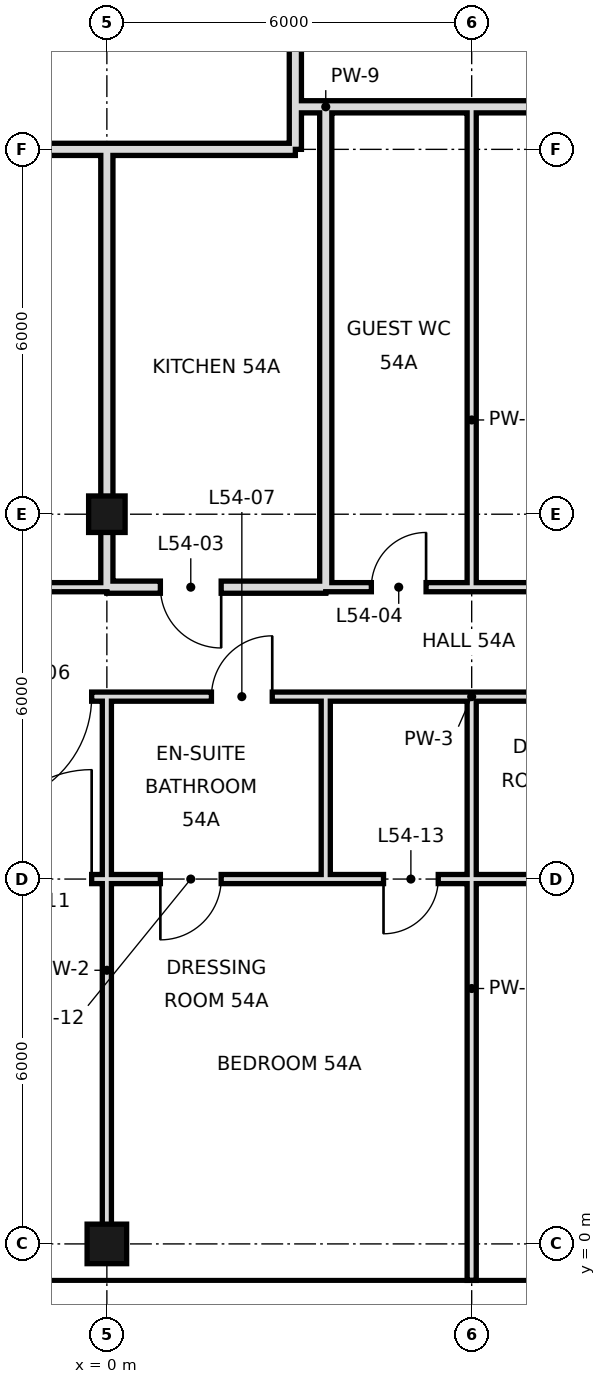
"""IFC4 building model, lengths in metres.
Left out: names, types, materials, properties, quantities, classifications, styles, units other than length and angle.
Written with IfcOpenShell. Run it as: python <this file> out.ifc"""

import sys

from ifc_helpers import new_model, si_unit, direction, frame, frame_2d, origin, origin_with_axes, origin_2d, place, context, subcontext, project, spatial, rectangle, hollow_rectangle, extrude, element, fill, save


model = new_model("IFC4")
c1 = context("Model", 3, precision=1e-05, world=origin(), true_north=direction((0.0, 1.0)))
c2 = subcontext(c1, "Body", "Model", "MODEL_VIEW")
j1 = project(units=[si_unit("LENGTHUNIT", "METRE"), si_unit("PLANEANGLEUNIT", "RADIAN")], contexts=[c1])
p1 = place(None, origin())
s1 = spatial("IfcSite", under=j1, at=p1, CompositionType="ELEMENT")
p2 = place(p1, origin())
s2 = spatial("IfcBuilding", under=s1, at=p2, CompositionType="ELEMENT")
p3 = place(p2, frame((0.0, 0.0, 229.8)))
s3 = spatial("IfcBuildingStorey", under=s2, at=p3, CompositionType="ELEMENT", Elevation=229.8)
p4 = place(p3, origin_with_axes())
e1 = element("IfcColumn", 1, at=p4, inside=s3, PredefinedType="COLUMN", context=c2, shape_type="SweptSolid", body=[
    extrude(hollow_rectangle(XDim=0.65, YDim=0.65, WallThickness=0.032, at=origin_2d()), origin(), (0.0, 0.0, 1.0), 4.4),
])
p5 = place(p3, frame((0.0, 12.0, 0.0), z_axis=(0.0, 0.0, 1.0), x_axis=(1.0, 0.0, 0.0)))
e2 = element("IfcColumn", 2, at=p5, inside=s3, PredefinedType="COLUMN", context=c2, shape_type="SweptSolid", body=[
    extrude(hollow_rectangle(XDim=0.6, YDim=0.6, WallThickness=0.028, at=origin_2d()), origin(), (0.0, 0.0, 1.0), 4.4),
])
p6 = place(p3, frame((0.0, 10.8, 0.0), z_axis=(0.0, 0.0, 1.0), x_axis=(0.0, 1.0, 0.0)))
e3 = element("IfcWall", 3, at=p6, inside=s3, PredefinedType="SOLIDWALL", context=c2, shape_type="SweptSolid", body=[
    extrude(rectangle(XDim=7.2, YDim=0.2, at=frame_2d((3.6, 0.0))), origin(), (0.0, 0.0, 1.0), 3.4),
])
p7 = place(p3, frame((0.0, 0.0, 0.0), z_axis=(0.0, 0.0, 1.0), x_axis=(0.0, 1.0, 0.0)))
e4 = element("IfcWall", 4, at=p7, inside=s3, PredefinedType="PARTITIONING", context=c2, shape_type="SweptSolid", body=[
    extrude(rectangle(XDim=9.0, YDim=0.15, at=frame_2d((4.5, 0.0))), origin(), (0.0, 0.0, 1.0), 3.4),
])
p8 = place(p3, frame((3.1, 18.7, 0.0), z_axis=(0.0, 0.0, 1.0), x_axis=(0.0, 1.0, 0.0)))
e5 = element("IfcWall", 5, at=p8, inside=s3, PredefinedType="SOLIDWALL", context=c2, shape_type="SweptSolid", body=[
    extrude(rectangle(XDim=25.7, YDim=0.2, at=frame_2d((12.85, 0.0))), origin(), (0.0, 0.0, 1.0), 3.65),
])
p9 = place(p8, frame((12.84, 0.0, 0.0)))
e6 = element("IfcOpeningElement", 6, at=p9, cuts=e5, PredefinedType="OPENING", context=c2, shape_type="SweptSolid", body=[
    extrude(rectangle(XDim=1.2, YDim=2.4, at=frame_2d((0.6, 1.2))), frame((0.0, 0.11, 0.0), z_axis=(0.0, -1.0, 0.0), x_axis=(1.0, 0.0, 0.0)), (0.0, 0.0, 1.0), 0.22),
])
p10 = place(p3, frame((3.1, 18.0, 0.0), z_axis=(0.0, 0.0, 1.0), x_axis=(0.0, 1.0, 0.0)))
e7 = element("IfcWall", 7, at=p10, inside=s3, PredefinedType="SOLIDWALL", context=c2, shape_type="SweptSolid", body=[
    extrude(rectangle(XDim=0.7, YDim=0.2, at=frame_2d((0.35, 0.0))), origin(), (0.0, 0.0, 1.0), 3.65),
])
p11 = place(p3, frame((3.6, 10.8, 0.0), z_axis=(0.0, 0.0, 1.0), x_axis=(0.0, 1.0, 0.0)))
e8 = element("IfcWall", 8, at=p11, inside=s3, PredefinedType="SOLIDWALL", context=c2, shape_type="SweptSolid", body=[
    extrude(rectangle(XDim=7.9, YDim=0.2, at=frame_2d((3.95, 0.0))), origin(), (0.0, 0.0, 1.0), 3.4),
])
p12 = place(p3, frame((3.6, 6.0, 0.0), z_axis=(0.0, 0.0, 1.0), x_axis=(0.0, 1.0, 0.0)))
e9 = element("IfcWall", 9, at=p12, inside=s3, PredefinedType="PARTITIONING", context=c2, shape_type="SweptSolid", body=[
    extrude(rectangle(XDim=3.0, YDim=0.15, at=frame_2d((1.5, 0.0))), origin(), (0.0, 0.0, 1.0), 4.1),
])
p13 = place(p3, frame((6.0, -0.6, 0.0), z_axis=(0.0, 0.0, 1.0), x_axis=(0.0, 1.0, 0.0)))
e10 = element("IfcWall", 10, at=p13, inside=s3, PredefinedType="PARTITIONING", context=c2, shape_type="SweptSolid", body=[
    extrude(rectangle(XDim=6.6, YDim=0.15, at=frame_2d((3.3, 0.0))), origin(), (0.0, 0.0, 1.0), 3.4),
])
p14 = place(p3, frame((6.0, 6.0, 0.0), z_axis=(0.0, 0.0, 1.0), x_axis=(0.0, 1.0, 0.0)))
e11 = element("IfcWall", 11, at=p14, inside=s3, PredefinedType="PARTITIONING", context=c2, shape_type="SweptSolid", body=[
    extrude(rectangle(XDim=3.0, YDim=0.15, at=frame_2d((1.5, 0.0))), origin(), (0.0, 0.0, 1.0), 3.4),
])
p15 = place(p3, frame((6.0, 10.8, 0.0), z_axis=(0.0, 0.0, 1.0), x_axis=(0.0, 1.0, 0.0)))
e12 = element("IfcWall", 12, at=p15, inside=s3, PredefinedType="PARTITIONING", context=c2, shape_type="SweptSolid", body=[
    extrude(rectangle(XDim=7.9, YDim=0.15, at=frame_2d((3.95, 0.0))), origin(), (0.0, 0.0, 1.0), 3.4),
])
p16 = place(p3, frame((0.0, 10.8, 0.0), z_axis=(0.0, 0.0, 1.0), x_axis=(1.0, 0.0, 0.0)))
e13 = element("IfcWall", 13, at=p16, inside=s3, PredefinedType="SOLIDWALL", context=c2, shape_type="SweptSolid", body=[
    extrude(rectangle(XDim=3.6, YDim=0.2, at=frame_2d((1.8, 0.0))), origin(), (0.0, 0.0, 1.0), 3.4),
])
p17 = place(p16, frame((0.88, 0.0, 0.0)))
e14 = element("IfcOpeningElement", 14, at=p17, cuts=e13, PredefinedType="OPENING", context=c2, shape_type="SweptSolid", body=[
    extrude(rectangle(XDim=1.0, YDim=2.4, at=frame_2d((0.5, 1.2))), frame((0.0, 0.11, 0.0), z_axis=(0.0, -1.0, 0.0), x_axis=(1.0, 0.0, 0.0)), (0.0, 0.0, 1.0), 0.22),
])
p18 = place(p3, frame((-12.6, 10.8, 0.0), z_axis=(0.0, 0.0, 1.0), x_axis=(1.0, 0.0, 0.0)))
e15 = element("IfcWall", 15, at=p18, inside=s3, PredefinedType="PARTITIONING", context=c2, shape_type="SweptSolid", body=[
    extrude(rectangle(XDim=12.6, YDim=0.15, at=frame_2d((6.3, 0.0))), origin(), (0.0, 0.0, 1.0), 4.1),
])
p19 = place(p18, frame((10.3, 0.0, 0.0)))
e16 = element("IfcOpeningElement", 16, at=p19, cuts=e15, PredefinedType="OPENING", context=c2, shape_type="SweptSolid", body=[
    extrude(rectangle(XDim=1.0, YDim=2.4, at=frame_2d((0.5, 1.2))), frame((0.0, 0.085, 0.0), z_axis=(0.0, -1.0, 0.0), x_axis=(1.0, 0.0, 0.0)), (0.0, 0.0, 1.0), 0.17),
])
p20 = place(p3, frame((6.0, 10.8, 0.0), z_axis=(0.0, 0.0, 1.0), x_axis=(1.0, 0.0, 0.0)))
e17 = element("IfcWall", 17, at=p20, inside=s3, PredefinedType="PARTITIONING", context=c2, shape_type="SweptSolid", body=[
    extrude(rectangle(XDim=18.0, YDim=0.15, at=frame_2d((9.0, 0.0))), origin(), (0.0, 0.0, 1.0), 4.1),
])
p21 = place(p20, frame((2.5, 0.0, 0.0)))
e18 = element("IfcOpeningElement", 18, at=p21, cuts=e17, PredefinedType="OPENING", context=c2, shape_type="SweptSolid", body=[
    extrude(rectangle(XDim=1.0, YDim=2.4, at=frame_2d((0.5, 1.2))), frame((0.0, 0.085, 0.0), z_axis=(0.0, -1.0, 0.0), x_axis=(1.0, 0.0, 0.0)), (0.0, 0.0, 1.0), 0.17),
])
p22 = place(p20, frame((11.5, 0.0, 0.0)))
e19 = element("IfcOpeningElement", 19, at=p22, cuts=e17, PredefinedType="OPENING", context=c2, shape_type="SweptSolid", body=[
    extrude(rectangle(XDim=1.0, YDim=2.4, at=frame_2d((0.5, 1.2))), frame((0.0, 0.085, 0.0), z_axis=(0.0, -1.0, 0.0), x_axis=(1.0, 0.0, 0.0)), (0.0, 0.0, 1.0), 0.17),
])
p23 = place(p3, frame((3.6, 10.8, 0.0), z_axis=(0.0, 0.0, 1.0), x_axis=(1.0, 0.0, 0.0)))
e20 = element("IfcWall", 20, at=p23, inside=s3, PredefinedType="PARTITIONING", context=c2, shape_type="SweptSolid", body=[
    extrude(rectangle(XDim=2.4, YDim=0.15, at=frame_2d((1.2, 0.0))), origin(), (0.0, 0.0, 1.0), 4.1),
])
p24 = place(p23, frame((0.75, 0.0, 0.0)))
e21 = element("IfcOpeningElement", 21, at=p24, cuts=e20, PredefinedType="OPENING", context=c2, shape_type="SweptSolid", body=[
    extrude(rectangle(XDim=0.9, YDim=2.4, at=frame_2d((0.45, 1.2))), frame((0.0, 0.085, 0.0), z_axis=(0.0, -1.0, 0.0), x_axis=(1.0, 0.0, 0.0)), (0.0, 0.0, 1.0), 0.17),
])
p25 = place(p3, frame((0.0, 18.0, 0.0), z_axis=(0.0, 0.0, 1.0), x_axis=(1.0, 0.0, 0.0)))
e22 = element("IfcWall", 22, at=p25, inside=s3, PredefinedType="SOLIDWALL", context=c2, shape_type="SweptSolid", body=[
    extrude(rectangle(XDim=3.1, YDim=0.2, at=frame_2d((1.55, 0.0))), origin(), (0.0, 0.0, 1.0), 3.4),
])
p26 = place(p3, frame((-12.6, 18.0, 0.0), z_axis=(0.0, 0.0, 1.0), x_axis=(1.0, 0.0, 0.0)))
e23 = element("IfcWall", 23, at=p26, inside=s3, PredefinedType="SOLIDWALL", context=c2, shape_type="SweptSolid", body=[
    extrude(rectangle(XDim=12.6, YDim=0.2, at=frame_2d((6.3, 0.0))), origin(), (0.0, 0.0, 1.0), 3.4),
])
p27 = place(p3, frame((3.6, 18.7, 0.0), z_axis=(0.0, 0.0, 1.0), x_axis=(1.0, 0.0, 0.0)))
e24 = element("IfcWall", 24, at=p27, inside=s3, PredefinedType="SOLIDWALL", context=c2, shape_type="SweptSolid", body=[
    extrude(rectangle(XDim=20.4, YDim=0.2, at=frame_2d((10.2, 0.0))), origin(), (0.0, 0.0, 1.0), 3.4),
])
p28 = place(p27, frame((4.8, 0.0, 0.0)))
e25 = element("IfcOpeningElement", 25, at=p28, cuts=e24, PredefinedType="OPENING", context=c2, shape_type="SweptSolid", body=[
    extrude(rectangle(XDim=1.2, YDim=2.4, at=frame_2d((0.6, 1.2))), frame((0.0, 0.11, 0.0), z_axis=(0.0, -1.0, 0.0), x_axis=(1.0, 0.0, 0.0)), (0.0, 0.0, 1.0), 0.22),
])
p29 = place(p3, frame((3.1, 18.7, 0.0), z_axis=(0.0, 0.0, 1.0), x_axis=(1.0, 0.0, 0.0)))
e26 = element("IfcWall", 26, at=p29, inside=s3, PredefinedType="SOLIDWALL", context=c2, shape_type="SweptSolid", body=[
    extrude(rectangle(XDim=0.5, YDim=0.2, at=frame_2d((0.25, 0.0))), origin(), (0.0, 0.0, 1.0), 4.1),
])
p30 = place(p3, frame((-12.0, 6.0, 0.0), z_axis=(0.0, 0.0, 1.0), x_axis=(1.0, 0.0, 0.0)))
e27 = element("IfcWall", 27, at=p30, inside=s3, PredefinedType="PARTITIONING", context=c2, shape_type="SweptSolid", body=[
    extrude(rectangle(XDim=15.6, YDim=0.15, at=frame_2d((7.8, 0.0))), origin(), (0.0, 0.0, 1.0), 3.4),
])
p31 = place(p30, frame((9.95, 0.0, 0.0)))
e28 = element("IfcOpeningElement", 28, at=p31, cuts=e27, PredefinedType="OPENING", context=c2, shape_type="SweptSolid", body=[
    extrude(rectangle(XDim=1.8, YDim=2.4, at=frame_2d((0.9, 1.2))), frame((0.0, 0.085, 0.0), z_axis=(0.0, -1.0, 0.0), x_axis=(1.0, 0.0, 0.0)), (0.0, 0.0, 1.0), 0.17),
])
p32 = place(p30, frame((12.88, 0.0, 0.0)))
e29 = element("IfcOpeningElement", 29, at=p32, cuts=e27, PredefinedType="OPENING", context=c2, shape_type="SweptSolid", body=[
    extrude(rectangle(XDim=1.0, YDim=2.4, at=frame_2d((0.5, 1.2))), frame((0.0, 0.085, 0.0), z_axis=(0.0, -1.0, 0.0), x_axis=(1.0, 0.0, 0.0)), (0.0, 0.0, 1.0), 0.17),
])
p33 = place(p3, frame((6.0, 6.0, 0.0), z_axis=(0.0, 0.0, 1.0), x_axis=(1.0, 0.0, 0.0)))
e30 = element("IfcWall", 30, at=p33, inside=s3, PredefinedType="PARTITIONING", context=c2, shape_type="SweptSolid", body=[
    extrude(rectangle(XDim=3.0, YDim=0.15, at=frame_2d((1.5, 0.0))), origin(), (0.0, 0.0, 1.0), 3.65),
])
p34 = place(p33, frame((1.3, 0.0, 0.0)))
e31 = element("IfcOpeningElement", 31, at=p34, cuts=e30, PredefinedType="OPENING", context=c2, shape_type="SweptSolid", body=[
    extrude(rectangle(XDim=1.0, YDim=2.4, at=frame_2d((0.5, 1.2))), frame((0.0, 0.085, 0.0), z_axis=(0.0, -1.0, 0.0), x_axis=(1.0, 0.0, 0.0)), (0.0, 0.0, 1.0), 0.17),
])
p35 = place(p3, frame((3.6, 6.0, 0.0), z_axis=(0.0, 0.0, 1.0), x_axis=(1.0, 0.0, 0.0)))
e32 = element("IfcWall", 32, at=p35, inside=s3, PredefinedType="PARTITIONING", context=c2, shape_type="SweptSolid", body=[
    extrude(rectangle(XDim=2.4, YDim=0.15, at=frame_2d((1.2, 0.0))), origin(), (0.0, 0.0, 1.0), 3.65),
])
p36 = place(p35, frame((0.95, 0.0, 0.0)))
e33 = element("IfcOpeningElement", 33, at=p36, cuts=e32, PredefinedType="OPENING", context=c2, shape_type="SweptSolid", body=[
    extrude(rectangle(XDim=0.9, YDim=2.4, at=frame_2d((0.45, 1.2))), frame((0.0, 0.085, 0.0), z_axis=(0.0, -1.0, 0.0), x_axis=(1.0, 0.0, 0.0)), (0.0, 0.0, 1.0), 0.17),
])
p37 = place(p3, frame((-12.6, 9.0, 0.0), z_axis=(0.0, 0.0, 1.0), x_axis=(1.0, 0.0, 0.0)))
e34 = element("IfcWall", 34, at=p37, inside=s3, PredefinedType="PARTITIONING", context=c2, shape_type="SweptSolid", body=[
    extrude(rectangle(XDim=16.2, YDim=0.15, at=frame_2d((8.1, 0.0))), origin(), (0.0, 0.0, 1.0), 4.1),
])
p38 = place(p37, frame((10.55, 0.0, 0.0)))
e35 = element("IfcOpeningElement", 35, at=p38, cuts=e34, PredefinedType="OPENING", context=c2, shape_type="SweptSolid", body=[
    extrude(rectangle(XDim=1.8, YDim=2.4, at=frame_2d((0.9, 1.2))), frame((0.0, 0.085, 0.0), z_axis=(0.0, -1.0, 0.0), x_axis=(1.0, 0.0, 0.0)), (0.0, 0.0, 1.0), 0.17),
])
p39 = place(p37, frame((14.32, 0.0, 0.0)))
e36 = element("IfcOpeningElement", 36, at=p39, cuts=e34, PredefinedType="OPENING", context=c2, shape_type="SweptSolid", body=[
    extrude(rectangle(XDim=1.0, YDim=2.4, at=frame_2d((0.5, 1.2))), frame((0.0, 0.085, 0.0), z_axis=(0.0, -1.0, 0.0), x_axis=(1.0, 0.0, 0.0)), (0.0, 0.0, 1.0), 0.17),
])
p40 = place(p3, frame((6.0, 9.0, 0.0), z_axis=(0.0, 0.0, 1.0), x_axis=(1.0, 0.0, 0.0)))
e37 = element("IfcWall", 37, at=p40, inside=s3, PredefinedType="PARTITIONING", context=c2, shape_type="SweptSolid", body=[
    extrude(rectangle(XDim=3.0, YDim=0.15, at=frame_2d((1.5, 0.0))), origin(), (0.0, 0.0, 1.0), 4.1),
])
p41 = place(p40, frame((1.0, 0.0, 0.0)))
e38 = element("IfcOpeningElement", 38, at=p41, cuts=e37, PredefinedType="OPENING", context=c2, shape_type="SweptSolid", body=[
    extrude(rectangle(XDim=1.0, YDim=2.4, at=frame_2d((0.5, 1.2))), frame((0.0, 0.085, 0.0), z_axis=(0.0, -1.0, 0.0), x_axis=(1.0, 0.0, 0.0)), (0.0, 0.0, 1.0), 0.17),
])
p42 = place(p3, frame((3.6, 9.0, 0.0), z_axis=(0.0, 0.0, 1.0), x_axis=(1.0, 0.0, 0.0)))
e39 = element("IfcWall", 39, at=p42, inside=s3, PredefinedType="PARTITIONING", context=c2, shape_type="SweptSolid", body=[
    extrude(rectangle(XDim=2.4, YDim=0.15, at=frame_2d((1.2, 0.0))), origin(), (0.0, 0.0, 1.0), 4.1),
])
p43 = place(p17, origin())
e40 = element("IfcDoor", 40, at=p43, inside=s3, OperationType="SINGLE_SWING_RIGHT", PredefinedType="DOOR", context=c2, shape_type="SweptSolid", body=[
    extrude(rectangle(XDim=1.0, YDim=2.4, at=frame_2d((0.5, 1.2))), frame((0.0, 0.025, 0.0), z_axis=(0.0, -1.0, 0.0), x_axis=(1.0, 0.0, 0.0)), (0.0, 0.0, 1.0), 0.05),
])
fill(e14, e40)
p44 = place(p24, frame((0.9, 0.0, 0.0), z_axis=(0.0, 0.0, 1.0), x_axis=(-1.0, 0.0, 0.0)))
e41 = element("IfcDoor", 41, at=p44, inside=s3, OperationType="SINGLE_SWING_LEFT", PredefinedType="DOOR", context=c2, shape_type="SweptSolid", body=[
    extrude(rectangle(XDim=0.9, YDim=2.4, at=frame_2d((0.45, 1.2))), frame((0.0, 0.025, 0.0), z_axis=(0.0, -1.0, 0.0), x_axis=(1.0, 0.0, 0.0)), (0.0, 0.0, 1.0), 0.05),
])
fill(e21, e41)
p45 = place(p38, frame((1.8, 0.0, 0.0), z_axis=(0.0, 0.0, 1.0), x_axis=(-1.0, 0.0, 0.0)))
e42 = element("IfcDoor", 42, at=p45, inside=s3, OperationType="SINGLE_SWING_RIGHT", PredefinedType="DOOR", context=c2, shape_type="SweptSolid", body=[
    extrude(rectangle(XDim=1.8, YDim=2.4, at=frame_2d((0.9, 1.2))), frame((0.0, 0.025, 0.0), z_axis=(0.0, -1.0, 0.0), x_axis=(1.0, 0.0, 0.0)), (0.0, 0.0, 1.0), 0.05),
])
fill(e35, e42)
p46 = place(p39, frame((1.0, 0.0, 0.0), z_axis=(0.0, 0.0, 1.0), x_axis=(-1.0, 0.0, 0.0)))
e43 = element("IfcDoor", 43, at=p46, inside=s3, OperationType="SINGLE_SWING_LEFT", PredefinedType="DOOR", context=c2, shape_type="SweptSolid", body=[
    extrude(rectangle(XDim=1.0, YDim=2.4, at=frame_2d((0.5, 1.2))), frame((0.0, 0.025, 0.0), z_axis=(0.0, -1.0, 0.0), x_axis=(1.0, 0.0, 0.0)), (0.0, 0.0, 1.0), 0.05),
])
fill(e36, e43)
p47 = place(p31, frame((1.8, 0.0, 0.0), z_axis=(0.0, 0.0, 1.0), x_axis=(-1.0, 0.0, 0.0)))
e44 = element("IfcDoor", 44, at=p47, inside=s3, OperationType="SINGLE_SWING_LEFT", PredefinedType="DOOR", context=c2, shape_type="SweptSolid", body=[
    extrude(rectangle(XDim=1.8, YDim=2.4, at=frame_2d((0.9, 1.2))), frame((0.0, 0.025, 0.0), z_axis=(0.0, -1.0, 0.0), x_axis=(1.0, 0.0, 0.0)), (0.0, 0.0, 1.0), 0.05),
])
fill(e28, e44)
p48 = place(p32, frame((1.0, 0.0, 0.0), z_axis=(0.0, 0.0, 1.0), x_axis=(-1.0, 0.0, 0.0)))
e45 = element("IfcDoor", 45, at=p48, inside=s3, OperationType="SINGLE_SWING_RIGHT", PredefinedType="DOOR", context=c2, shape_type="SweptSolid", body=[
    extrude(rectangle(XDim=1.0, YDim=2.4, at=frame_2d((0.5, 1.2))), frame((0.0, 0.025, 0.0), z_axis=(0.0, -1.0, 0.0), x_axis=(1.0, 0.0, 0.0)), (0.0, 0.0, 1.0), 0.05),
])
fill(e29, e45)
p49 = place(p36, frame((0.9, 0.0, 0.0), z_axis=(0.0, 0.0, 1.0), x_axis=(-1.0, 0.0, 0.0)))
e46 = element("IfcDoor", 46, at=p49, inside=s3, OperationType="SINGLE_SWING_RIGHT", PredefinedType="DOOR", context=c2, shape_type="SweptSolid", body=[
    extrude(rectangle(XDim=0.9, YDim=2.4, at=frame_2d((0.45, 1.2))), frame((0.0, 0.025, 0.0), z_axis=(0.0, -1.0, 0.0), x_axis=(1.0, 0.0, 0.0)), (0.0, 0.0, 1.0), 0.05),
])
fill(e33, e46)
save(model, sys.argv[1])
